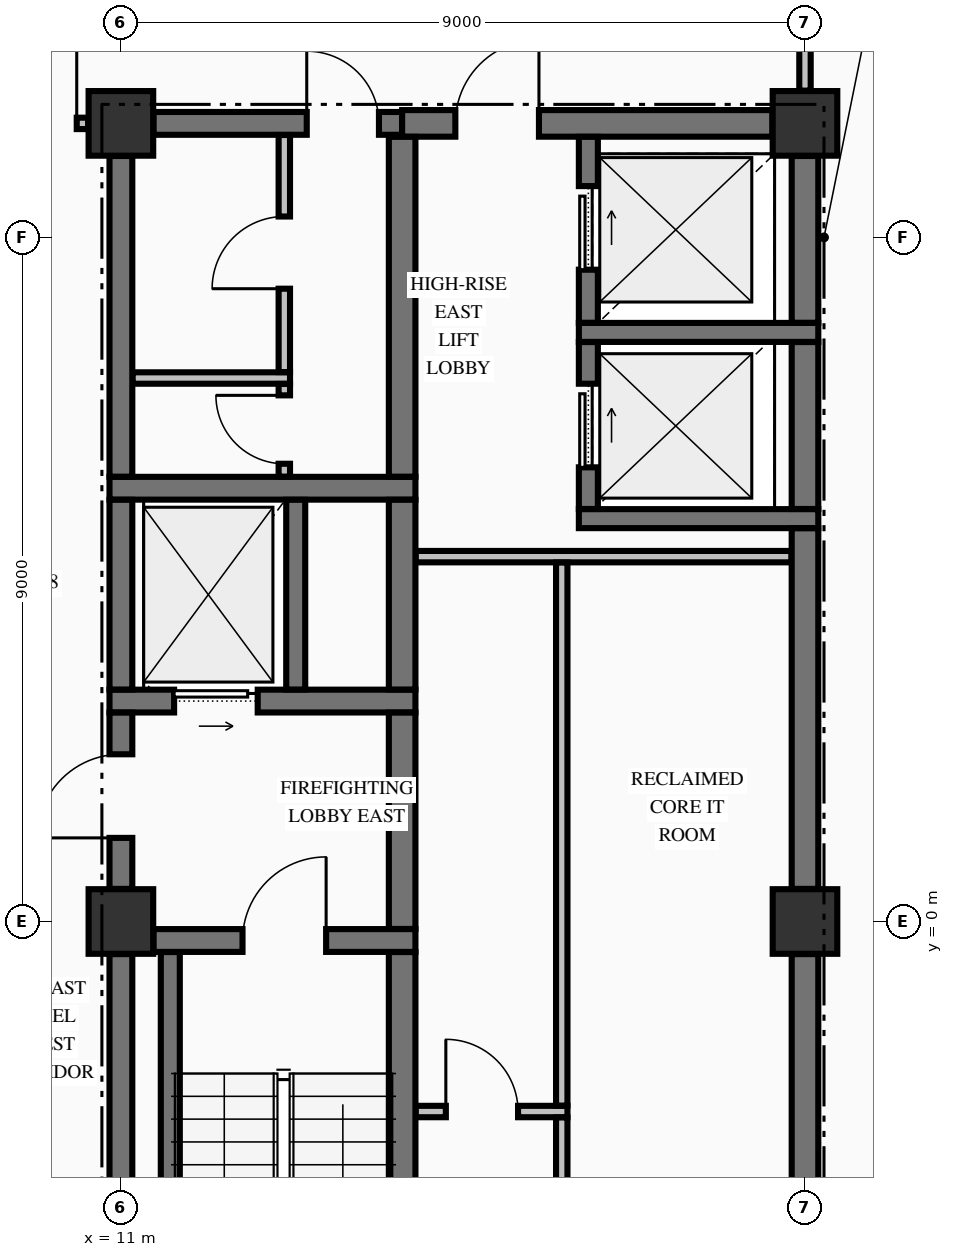
"""IFC4 building model, lengths in metres.
Left out: names, types, materials, properties, quantities, classifications, styles, units other than length and angle.
Written with IfcOpenShell. Run it as: python <this file> out.ifc"""

import sys

from ifc_helpers import new_model, si_unit, direction, frame, frame_2d, origin, origin_2d, place, context, subcontext, project, spatial, rectangle, extrude, element, fill, save


model = new_model("IFC4")
c1 = context("Model", 3, precision=1e-05, world=origin(), true_north=direction((0.0, 1.0)))
c2 = subcontext(c1, "Body", "Model", "MODEL_VIEW")
j1 = project(units=[si_unit("LENGTHUNIT", "METRE"), si_unit("PLANEANGLEUNIT", "RADIAN")], contexts=[c1])
p1 = place(None, origin())
s1 = spatial("IfcSite", under=j1, at=p1, CompositionType="ELEMENT")
p2 = place(p1, origin())
s2 = spatial("IfcBuilding", under=s1, at=p2, CompositionType="ELEMENT")
p3 = place(p2, frame((0.0, 0.0, 205.06)))
s3 = spatial("IfcBuildingStorey", under=s2, at=p3, CompositionType="ELEMENT", Elevation=205.06)
for number, where, z_axis, x_axis in (
    (1, (11.0, 0.0, -0.25), (0.0, 0.0, 1.0), (1.0, 0.0, 0.0)),
    (2, (11.0, 10.5, -0.25), (0.0, 0.0, 1.0), (1.0, 0.0, 0.0)),
    (3, (20.0, 10.5, -0.25), (0.0, 0.0, 1.0), (1.0, 0.0, 0.0)),
    (4, (20.0, 0.0, -0.25), (0.0, 0.0, 1.0), (1.0, 0.0, 0.0)),
):
    element("IfcColumn", number, at=place(p3, frame(where, z_axis=z_axis, x_axis=x_axis)), inside=s3, PredefinedType="COLUMN", context=c2, shape_type="SweptSolid", body=[
        extrude(rectangle(XDim=0.85, YDim=0.85, at=origin_2d()), origin(), (0.0, 0.0, 1.0), 3.4),
    ])
p4 = place(p3, frame((11.429, -0.25, 0.0), z_axis=(0.0, 0.0, 1.0), x_axis=(1.0, 0.0, 0.0)))
e5 = element("IfcWall", 5, at=p4, inside=s3, PredefinedType="SHEAR", context=c2, shape_type="SweptSolid", body=[
    extrude(rectangle(XDim=3.446, YDim=0.3, at=frame_2d((1.723, 0.0))), origin(), (0.0, 0.0, 1.0), 3.15),
])
p5 = place(p4, frame((1.171, 0.0, 0.0)))
e6 = element("IfcOpeningElement", 6, at=p5, cuts=e5, PredefinedType="OPENING", context=c2, shape_type="SweptSolid", body=[
    extrude(rectangle(XDim=1.1, YDim=2.15, at=frame_2d((0.55, 1.075))), frame((0.0, 0.16, 0.0), z_axis=(0.0, -1.0, 0.0), x_axis=(1.0, 0.0, 0.0)), (0.0, 0.0, 1.0), 0.32),
])
p6 = place(p3, frame((10.85, 2.9, 0.0), z_axis=(0.0, 0.0, 1.0), x_axis=(1.0, 0.0, 0.0)))
e7 = element("IfcWall", 7, at=p6, inside=s3, PredefinedType="SHEAR", context=c2, shape_type="SweptSolid", body=[
    extrude(rectangle(XDim=4.025, YDim=0.3, at=frame_2d((2.012, 0.0))), origin(), (0.0, 0.0, 1.0), 3.15),
])
p7 = place(p6, frame((0.85, 0.0, 0.0)))
e8 = element("IfcOpeningElement", 8, at=p7, cuts=e7, PredefinedType="OPENING", context=c2, shape_type="SweptSolid", body=[
    extrude(rectangle(XDim=1.1, YDim=2.2, at=frame_2d((0.55, 1.1))), frame((0.0, 0.16, 0.0), z_axis=(0.0, -1.0, 0.0), x_axis=(1.0, 0.0, 0.0)), (0.0, 0.0, 1.0), 0.32),
])
p8 = place(p3, frame((17.025, 5.3, 0.0), z_axis=(0.0, 0.0, 1.0), x_axis=(1.0, 0.0, 0.0)))
e9 = element("IfcWall", 9, at=p8, inside=s3, PredefinedType="SOLIDWALL", context=c2, shape_type="SweptSolid", body=[
    extrude(rectangle(XDim=3.15, YDim=0.25, at=frame_2d((1.575, 0.0))), origin(), (0.0, 0.0, 1.0), 3.15),
])
p9 = place(p3, frame((10.85, 5.7, 0.0), z_axis=(0.0, 0.0, 1.0), x_axis=(1.0, 0.0, 0.0)))
e10 = element("IfcWall", 10, at=p9, inside=s3, PredefinedType="SHEAR", context=c2, shape_type="SweptSolid", body=[
    extrude(rectangle(XDim=4.025, YDim=0.3, at=frame_2d((2.012, 0.0))), origin(), (0.0, 0.0, 1.0), 3.15),
])
p10 = place(p3, frame((17.025, 7.75, 0.0), z_axis=(0.0, 0.0, 1.0), x_axis=(1.0, 0.0, 0.0)))
e11 = element("IfcWall", 11, at=p10, inside=s3, PredefinedType="SOLIDWALL", context=c2, shape_type="SweptSolid", body=[
    extrude(rectangle(XDim=3.15, YDim=0.25, at=frame_2d((1.575, 0.0))), origin(), (0.0, 0.0, 1.0), 3.15),
])
p11 = place(p3, frame((11.429, 10.5, 0.0), z_axis=(0.0, 0.0, 1.0), x_axis=(1.0, 0.0, 0.0)))
e12 = element("IfcWall", 12, at=p11, inside=s3, PredefinedType="SHEAR", context=c2, shape_type="SweptSolid", body=[
    extrude(rectangle(XDim=3.271, YDim=0.3, at=frame_2d((1.635, 0.0))), origin(), (0.0, 0.0, 1.0), 3.15),
])
p12 = place(p11, frame((2.016, 0.0, 0.0)))
e13 = element("IfcOpeningElement", 13, at=p12, cuts=e12, PredefinedType="OPENING", context=c2, shape_type="SweptSolid", body=[
    extrude(rectangle(XDim=0.95, YDim=2.15, at=frame_2d((0.475, 1.075))), frame((0.0, 0.16, 0.0), z_axis=(0.0, -1.0, 0.0), x_axis=(1.0, 0.0, 0.0)), (0.0, 0.0, 1.0), 0.32),
])
p13 = place(p3, frame((14.7, 10.5, 0.0), z_axis=(0.0, 0.0, 1.0), x_axis=(1.0, 0.0, 0.0)))
e14 = element("IfcWall", 14, at=p13, inside=s3, PredefinedType="SHEAR", context=c2, shape_type="SweptSolid", body=[
    extrude(rectangle(XDim=4.871, YDim=0.35, at=frame_2d((2.436, 0.0))), origin(), (0.0, 0.0, 1.0), 3.15),
])
p14 = place(p13, frame((0.7, 0.0, 0.0)))
e15 = element("IfcOpeningElement", 15, at=p14, cuts=e14, PredefinedType="OPENING", context=c2, shape_type="SweptSolid", body=[
    extrude(rectangle(XDim=1.1, YDim=2.15, at=frame_2d((0.55, 1.075))), frame((0.0, 0.185, 0.0), z_axis=(0.0, -1.0, 0.0), x_axis=(1.0, 0.0, 0.0)), (0.0, 0.0, 1.0), 0.37),
])
p15 = place(p3, frame((14.878, -2.5, 0.0), z_axis=(0.0, 0.0, 1.0), x_axis=(1.0, 0.0, 0.0)))
e16 = element("IfcWall", 16, at=p15, inside=s3, PredefinedType="PARTITIONING", context=c2, shape_type="SweptSolid", body=[
    extrude(rectangle(XDim=1.997, YDim=0.15, at=frame_2d((0.999, 0.0))), origin(), (0.0, 0.0, 1.0), 3.15),
])
p16 = place(p15, frame((0.397, 0.0, 0.0)))
e17 = element("IfcOpeningElement", 17, at=p16, cuts=e16, PredefinedType="OPENING", context=c2, shape_type="SweptSolid", body=[
    extrude(rectangle(XDim=0.95, YDim=2.15, at=frame_2d((0.475, 1.075))), frame((0.0, 0.085, 0.0), z_axis=(0.0, -1.0, 0.0), x_axis=(1.0, 0.0, 0.0)), (0.0, 0.0, 1.0), 0.17),
])
p17 = place(p3, frame((14.878, 4.8, 0.0), z_axis=(0.0, 0.0, 1.0), x_axis=(1.0, 0.0, 0.0)))
e18 = element("IfcWall", 18, at=p17, inside=s3, PredefinedType="PARTITIONING", context=c2, shape_type="SweptSolid", body=[
    extrude(rectangle(XDim=4.944, YDim=0.15, at=frame_2d((2.472, 0.0))), origin(), (0.0, 0.0, 1.0), 3.15),
])
p18 = place(p3, frame((11.153, 7.15, 0.0), z_axis=(0.0, 0.0, 1.0), x_axis=(1.0, 0.0, 0.0)))
e19 = element("IfcWall", 19, at=p18, inside=s3, PredefinedType="PARTITIONING", context=c2, shape_type="SweptSolid", body=[
    extrude(rectangle(XDim=2.072, YDim=0.15, at=frame_2d((1.036, 0.0))), origin(), (0.0, 0.0, 1.0), 3.15),
])
p19 = place(p3, frame((-10.569, 10.5, 0.0), z_axis=(0.0, 0.0, 1.0), x_axis=(1.0, 0.0, 0.0)))
e20 = element("IfcWall", 20, at=p19, inside=s3, PredefinedType="PARTITIONING", context=c2, shape_type="SweptSolid", body=[
    extrude(rectangle(XDim=21.138, YDim=0.15, at=frame_2d((10.569, 0.0))), origin(), (0.0, 0.0, 1.0), 3.15),
])
p20 = place(p19, frame((0.15, 0.0, 0.0)))
e21 = element("IfcOpeningElement", 21, at=p20, cuts=e20, PredefinedType="OPENING", context=c2, shape_type="SweptSolid", body=[
    extrude(rectangle(XDim=1.05, YDim=2.15, at=frame_2d((0.525, 1.075))), frame((0.0, 0.085, 0.0), z_axis=(0.0, -1.0, 0.0), x_axis=(1.0, 0.0, 0.0)), (0.0, 0.0, 1.0), 0.17),
])
p21 = place(p19, frame((19.938, 0.0, 0.0)))
e22 = element("IfcOpeningElement", 22, at=p21, cuts=e20, PredefinedType="OPENING", context=c2, shape_type="SweptSolid", body=[
    extrude(rectangle(XDim=1.05, YDim=2.15, at=frame_2d((0.525, 1.075))), frame((0.0, 0.085, 0.0), z_axis=(0.0, -1.0, 0.0), x_axis=(1.0, 0.0, 0.0)), (0.0, 0.0, 1.0), 0.17),
])
p22 = place(p3, frame((11.0, -9.521, 0.0), z_axis=(0.0, 0.0, 1.0), x_axis=(0.0, 1.0, 0.0)))
e23 = element("IfcWall", 23, at=p22, inside=s3, PredefinedType="SHEAR", context=c2, shape_type="SweptSolid", body=[
    extrude(rectangle(XDim=9.092, YDim=0.3, at=frame_2d((4.546, 0.0))), origin(), (0.0, 0.0, 1.0), 3.15),
])
p23 = place(p3, frame((11.0, 0.429, 0.0), z_axis=(0.0, 0.0, 1.0), x_axis=(0.0, 1.0, 0.0)))
e24 = element("IfcWall", 24, at=p23, inside=s3, PredefinedType="SHEAR", context=c2, shape_type="SweptSolid", body=[
    extrude(rectangle(XDim=2.319, YDim=0.3, at=frame_2d((1.16, 0.0))), origin(), (0.0, 0.0, 1.0), 3.15),
])
p24 = place(p23, frame((0.671, 0.0, 0.0)))
e25 = element("IfcOpeningElement", 25, at=p24, cuts=e24, PredefinedType="OPENING", context=c2, shape_type="SweptSolid", body=[
    extrude(rectangle(XDim=1.1, YDim=2.15, at=frame_2d((0.55, 1.075))), frame((0.0, 0.16, 0.0), z_axis=(0.0, -1.0, 0.0), x_axis=(1.0, 0.0, 0.0)), (0.0, 0.0, 1.0), 0.32),
])
p25 = place(p3, frame((11.0, 3.052, 0.0), z_axis=(0.0, 0.0, 1.0), x_axis=(0.0, 1.0, 0.0)))
e26 = element("IfcWall", 26, at=p25, inside=s3, PredefinedType="SHEAR", context=c2, shape_type="SweptSolid", body=[
    extrude(rectangle(XDim=2.496, YDim=0.3, at=frame_2d((1.248, 0.0))), origin(), (0.0, 0.0, 1.0), 3.15),
])
p26 = place(p3, frame((11.0, 5.852, 0.0), z_axis=(0.0, 0.0, 1.0), x_axis=(0.0, 1.0, 0.0)))
e27 = element("IfcWall", 27, at=p26, inside=s3, PredefinedType="SHEAR", context=c2, shape_type="SweptSolid", body=[
    extrude(rectangle(XDim=4.219, YDim=0.3, at=frame_2d((2.109, 0.0))), origin(), (0.0, 0.0, 1.0), 3.15),
])
p27 = place(p3, frame((11.65, -9.798, 0.0), z_axis=(0.0, 0.0, 1.0), x_axis=(0.0, 1.0, 0.0)))
e28 = element("IfcWall", 28, at=p27, inside=s3, PredefinedType="SOLIDWALL", context=c2, shape_type="SweptSolid", body=[
    extrude(rectangle(XDim=9.396, YDim=0.25, at=frame_2d((4.698, 0.0))), origin(), (0.0, 0.0, 1.0), 3.15),
])
p28 = place(p3, frame((13.3, 3.052, 0.0), z_axis=(0.0, 0.0, 1.0), x_axis=(0.0, 1.0, 0.0)))
e29 = element("IfcWall", 29, at=p28, inside=s3, PredefinedType="SOLIDWALL", context=c2, shape_type="SweptSolid", body=[
    extrude(rectangle(XDim=2.496, YDim=0.25, at=frame_2d((1.248, 0.0))), origin(), (0.0, 0.0, 1.0), 3.15),
])
p29 = place(p3, frame((14.7, -9.773, 0.0), z_axis=(0.0, 0.0, 1.0), x_axis=(0.0, 1.0, 0.0)))
e30 = element("IfcWall", 30, at=p29, inside=s3, PredefinedType="SHEAR", context=c2, shape_type="SweptSolid", body=[
    extrude(rectangle(XDim=9.371, YDim=0.35, at=frame_2d((4.686, 0.0))), origin(), (0.0, 0.0, 1.0), 3.15),
])
p30 = place(p3, frame((14.7, -0.098, 0.0), z_axis=(0.0, 0.0, 1.0), x_axis=(0.0, 1.0, 0.0)))
e31 = element("IfcWall", 31, at=p30, inside=s3, PredefinedType="SHEAR", context=c2, shape_type="SweptSolid", body=[
    extrude(rectangle(XDim=2.846, YDim=0.35, at=frame_2d((1.423, 0.0))), origin(), (0.0, 0.0, 1.0), 3.15),
])
p31 = place(p3, frame((14.7, 3.052, 0.0), z_axis=(0.0, 0.0, 1.0), x_axis=(0.0, 1.0, 0.0)))
e32 = element("IfcWall", 32, at=p31, inside=s3, PredefinedType="SHEAR", context=c2, shape_type="SweptSolid", body=[
    extrude(rectangle(XDim=2.496, YDim=0.35, at=frame_2d((1.248, 0.0))), origin(), (0.0, 0.0, 1.0), 3.15),
])
p32 = place(p3, frame((14.7, 5.852, 0.0), z_axis=(0.0, 0.0, 1.0), x_axis=(0.0, 1.0, 0.0)))
e33 = element("IfcWall", 33, at=p32, inside=s3, PredefinedType="SHEAR", context=c2, shape_type="SweptSolid", body=[
    extrude(rectangle(XDim=4.471, YDim=0.35, at=frame_2d((2.235, 0.0))), origin(), (0.0, 0.0, 1.0), 3.15),
])
p33 = place(p3, frame((17.15, 5.427, 0.0), z_axis=(0.0, 0.0, 1.0), x_axis=(0.0, 1.0, 0.0)))
e34 = element("IfcWall", 34, at=p33, inside=s3, PredefinedType="SOLIDWALL", context=c2, shape_type="SweptSolid", body=[
    extrude(rectangle(XDim=2.196, YDim=0.25, at=frame_2d((1.098, 0.0))), origin(), (0.0, 0.0, 1.0), 3.15),
])
p34 = place(p33, frame((0.548, 0.0, 0.0)))
e35 = element("IfcOpeningElement", 35, at=p34, cuts=e34, PredefinedType="OPENING", context=c2, shape_type="SweptSolid", body=[
    extrude(rectangle(XDim=1.1, YDim=2.2, at=frame_2d((0.55, 1.1))), frame((0.0, 0.135, 0.0), z_axis=(0.0, -1.0, 0.0), x_axis=(1.0, 0.0, 0.0)), (0.0, 0.0, 1.0), 0.27),
])
p35 = place(p3, frame((17.15, 7.877, 0.0), z_axis=(0.0, 0.0, 1.0), x_axis=(0.0, 1.0, 0.0)))
e36 = element("IfcWall", 36, at=p35, inside=s3, PredefinedType="SOLIDWALL", context=c2, shape_type="SweptSolid", body=[
    extrude(rectangle(XDim=2.446, YDim=0.25, at=frame_2d((1.223, 0.0))), origin(), (0.0, 0.0, 1.0), 3.15),
])
p36 = place(p35, frame((0.698, 0.0, 0.0)))
e37 = element("IfcOpeningElement", 37, at=p36, cuts=e36, PredefinedType="OPENING", context=c2, shape_type="SweptSolid", body=[
    extrude(rectangle(XDim=1.1, YDim=2.2, at=frame_2d((0.55, 1.1))), frame((0.0, 0.135, 0.0), z_axis=(0.0, -1.0, 0.0), x_axis=(1.0, 0.0, 0.0)), (0.0, 0.0, 1.0), 0.27),
])
p37 = place(p3, frame((20.0, -9.521, 0.0), z_axis=(0.0, 0.0, 1.0), x_axis=(0.0, 1.0, 0.0)))
e38 = element("IfcWall", 38, at=p37, inside=s3, PredefinedType="SHEAR", context=c2, shape_type="SweptSolid", body=[
    extrude(rectangle(XDim=9.092, YDim=0.35, at=frame_2d((4.546, 0.0))), origin(), (0.0, 0.0, 1.0), 3.15),
])
p38 = place(p3, frame((20.0, 0.429, 0.0), z_axis=(0.0, 0.0, 1.0), x_axis=(0.0, 1.0, 0.0)))
e39 = element("IfcWall", 39, at=p38, inside=s3, PredefinedType="SHEAR", context=c2, shape_type="SweptSolid", body=[
    extrude(rectangle(XDim=4.744, YDim=0.35, at=frame_2d((2.372, 0.0))), origin(), (0.0, 0.0, 1.0), 3.15),
])
p39 = place(p3, frame((20.0, 5.427, 0.0), z_axis=(0.0, 0.0, 1.0), x_axis=(0.0, 1.0, 0.0)))
e40 = element("IfcWall", 40, at=p39, inside=s3, PredefinedType="SHEAR", context=c2, shape_type="SweptSolid", body=[
    extrude(rectangle(XDim=2.196, YDim=0.35, at=frame_2d((1.098, 0.0))), origin(), (0.0, 0.0, 1.0), 3.15),
])
p40 = place(p3, frame((20.0, 7.877, 0.0), z_axis=(0.0, 0.0, 1.0), x_axis=(0.0, 1.0, 0.0)))
e41 = element("IfcWall", 41, at=p40, inside=s3, PredefinedType="SHEAR", context=c2, shape_type="SweptSolid", body=[
    extrude(rectangle(XDim=2.194, YDim=0.35, at=frame_2d((1.097, 0.0))), origin(), (0.0, 0.0, 1.0), 3.15),
])
p41 = place(p3, frame((13.15, 5.853, 0.0), z_axis=(0.0, 0.0, 1.0), x_axis=(0.0, 1.0, 0.0)))
e42 = element("IfcWall", 42, at=p41, inside=s3, PredefinedType="PARTITIONING", context=c2, shape_type="SweptSolid", body=[
    extrude(rectangle(XDim=1.219, YDim=0.15, at=frame_2d((0.609, 0.0))), origin(), (0.0, 0.0, 1.0), 3.15),
])
p42 = place(p41, frame((0.169, 0.0, 0.0)))
e43 = element("IfcOpeningElement", 43, at=p42, cuts=e42, PredefinedType="OPENING", context=c2, shape_type="SweptSolid", body=[
    extrude(rectangle(XDim=0.9, YDim=2.15, at=frame_2d((0.45, 1.075))), frame((0.0, 0.085, 0.0), z_axis=(0.0, -1.0, 0.0), x_axis=(1.0, 0.0, 0.0)), (0.0, 0.0, 1.0), 0.17),
])
p43 = place(p3, frame((13.15, 7.228, 0.0), z_axis=(0.0, 0.0, 1.0), x_axis=(0.0, 1.0, 0.0)))
e44 = element("IfcWall", 44, at=p43, inside=s3, PredefinedType="PARTITIONING", context=c2, shape_type="SweptSolid", body=[
    extrude(rectangle(XDim=3.119, YDim=0.15, at=frame_2d((1.56, 0.0))), origin(), (0.0, 0.0, 1.0), 3.15),
])
p44 = place(p43, frame((1.097, 0.0, 0.0)))
e45 = element("IfcOpeningElement", 45, at=p44, cuts=e44, PredefinedType="OPENING", context=c2, shape_type="SweptSolid", body=[
    extrude(rectangle(XDim=0.95, YDim=2.15, at=frame_2d((0.475, 1.075))), frame((0.0, 0.085, 0.0), z_axis=(0.0, -1.0, 0.0), x_axis=(1.0, 0.0, 0.0)), (0.0, 0.0, 1.0), 0.17),
])
p45 = place(p3, frame((16.8, -9.772, 0.0), z_axis=(0.0, 0.0, 1.0), x_axis=(0.0, 1.0, 0.0)))
e46 = element("IfcWall", 46, at=p45, inside=s3, PredefinedType="PARTITIONING", context=c2, shape_type="SweptSolid", body=[
    extrude(rectangle(XDim=7.194, YDim=0.15, at=frame_2d((3.597, 0.0))), origin(), (0.0, 0.0, 1.0), 3.15),
])
p46 = place(p3, frame((16.8, -2.422, 0.0), z_axis=(0.0, 0.0, 1.0), x_axis=(0.0, 1.0, 0.0)))
e47 = element("IfcWall", 47, at=p46, inside=s3, PredefinedType="PARTITIONING", context=c2, shape_type="SweptSolid", body=[
    extrude(rectangle(XDim=7.144, YDim=0.15, at=frame_2d((3.572, 0.0))), origin(), (0.0, 0.0, 1.0), 3.15),
])
p47 = place(p3, frame((20.0, 10.931, 0.0), z_axis=(0.0, 0.0, 1.0), x_axis=(0.0, 1.0, 0.0)))
e48 = element("IfcWall", 48, at=p47, inside=s3, PredefinedType="PARTITIONING", context=c2, shape_type="SweptSolid", body=[
    extrude(rectangle(XDim=1.741, YDim=0.15, at=frame_2d((0.871, 0.0))), origin(), (0.0, 0.0, 1.0), 2.342),
])
p48 = place(p5, origin())
e49 = element("IfcDoor", 49, at=p48, inside=s3, OperationType="SINGLE_SWING_RIGHT", PredefinedType="DOOR", context=c2, shape_type="SweptSolid", body=[
    extrude(rectangle(XDim=1.1, YDim=2.15, at=frame_2d((0.55, 1.075))), frame((0.0, 0.025, 0.0), z_axis=(0.0, -1.0, 0.0), x_axis=(1.0, 0.0, 0.0)), (0.0, 0.0, 1.0), 0.05),
])
fill(e6, e49)
p49 = place(p24, origin())
e50 = element("IfcDoor", 50, at=p49, inside=s3, OperationType="SINGLE_SWING_LEFT", PredefinedType="DOOR", context=c2, shape_type="SweptSolid", body=[
    extrude(rectangle(XDim=1.1, YDim=2.15, at=frame_2d((0.55, 1.075))), frame((0.0, 0.025, 0.0), z_axis=(0.0, -1.0, 0.0), x_axis=(1.0, 0.0, 0.0)), (0.0, 0.0, 1.0), 0.05),
])
fill(e25, e50)
p50 = place(p7, origin())
e51 = element("IfcDoor", 51, at=p50, inside=s3, OperationType="SLIDING_TO_RIGHT", PredefinedType="DOOR", context=c2, shape_type="SweptSolid", body=[
    extrude(rectangle(XDim=1.1, YDim=2.2, at=frame_2d((0.55, 1.1))), frame((0.0, 0.025, 0.0), z_axis=(0.0, -1.0, 0.0), x_axis=(1.0, 0.0, 0.0)), (0.0, 0.0, 1.0), 0.05),
])
fill(e8, e51)
p51 = place(p12, origin())
e52 = element("IfcDoor", 52, at=p51, inside=s3, OperationType="SINGLE_SWING_LEFT", PredefinedType="DOOR", context=c2, shape_type="SweptSolid", body=[
    extrude(rectangle(XDim=0.95, YDim=2.15, at=frame_2d((0.475, 1.075))), frame((0.0, 0.025, 0.0), z_axis=(0.0, -1.0, 0.0), x_axis=(1.0, 0.0, 0.0)), (0.0, 0.0, 1.0), 0.05),
])
fill(e13, e52)
p52 = place(p42, origin())
e53 = element("IfcDoor", 53, at=p52, inside=s3, OperationType="SINGLE_SWING_RIGHT", PredefinedType="DOOR", context=c2, shape_type="SweptSolid", body=[
    extrude(rectangle(XDim=0.9, YDim=2.15, at=frame_2d((0.45, 1.075))), frame((0.0, 0.025, 0.0), z_axis=(0.0, -1.0, 0.0), x_axis=(1.0, 0.0, 0.0)), (0.0, 0.0, 1.0), 0.05),
])
fill(e43, e53)
p53 = place(p44, origin())
e54 = element("IfcDoor", 54, at=p53, inside=s3, OperationType="SINGLE_SWING_LEFT", PredefinedType="DOOR", context=c2, shape_type="SweptSolid", body=[
    extrude(rectangle(XDim=0.95, YDim=2.15, at=frame_2d((0.475, 1.075))), frame((0.0, 0.025, 0.0), z_axis=(0.0, -1.0, 0.0), x_axis=(1.0, 0.0, 0.0)), (0.0, 0.0, 1.0), 0.05),
])
fill(e45, e54)
p54 = place(p34, origin())
e55 = element("IfcDoor", 55, at=p54, inside=s3, OperationType="SLIDING_TO_RIGHT", PredefinedType="DOOR", context=c2, shape_type="SweptSolid", body=[
    extrude(rectangle(XDim=1.1, YDim=2.2, at=frame_2d((0.55, 1.1))), frame((0.0, 0.025, 0.0), z_axis=(0.0, -1.0, 0.0), x_axis=(1.0, 0.0, 0.0)), (0.0, 0.0, 1.0), 0.05),
])
fill(e35, e55)
p55 = place(p36, origin())
e56 = element("IfcDoor", 56, at=p55, inside=s3, OperationType="SLIDING_TO_RIGHT", PredefinedType="DOOR", context=c2, shape_type="SweptSolid", body=[
    extrude(rectangle(XDim=1.1, YDim=2.2, at=frame_2d((0.55, 1.1))), frame((0.0, 0.025, 0.0), z_axis=(0.0, -1.0, 0.0), x_axis=(1.0, 0.0, 0.0)), (0.0, 0.0, 1.0), 0.05),
])
fill(e37, e56)
p56 = place(p14, origin())
e57 = element("IfcDoor", 57, at=p56, inside=s3, OperationType="SINGLE_SWING_RIGHT", PredefinedType="DOOR", context=c2, shape_type="SweptSolid", body=[
    extrude(rectangle(XDim=1.1, YDim=2.15, at=frame_2d((0.55, 1.075))), frame((0.0, 0.025, 0.0), z_axis=(0.0, -1.0, 0.0), x_axis=(1.0, 0.0, 0.0)), (0.0, 0.0, 1.0), 0.05),
])
fill(e15, e57)
p57 = place(p16, origin())
e58 = element("IfcDoor", 58, at=p57, inside=s3, OperationType="SINGLE_SWING_LEFT", PredefinedType="DOOR", context=c2, shape_type="SweptSolid", body=[
    extrude(rectangle(XDim=0.95, YDim=2.15, at=frame_2d((0.475, 1.075))), frame((0.0, 0.025, 0.0), z_axis=(0.0, -1.0, 0.0), x_axis=(1.0, 0.0, 0.0)), (0.0, 0.0, 1.0), 0.05),
])
fill(e17, e58)
p58 = place(p21, origin())
e59 = element("IfcDoor", 59, at=p58, inside=s3, OperationType="SINGLE_SWING_RIGHT", PredefinedType="DOOR", context=c2, shape_type="SweptSolid", body=[
    extrude(rectangle(XDim=1.05, YDim=2.15, at=frame_2d((0.525, 1.075))), frame((0.0, 0.025, 0.0), z_axis=(0.0, -1.0, 0.0), x_axis=(1.0, 0.0, 0.0)), (0.0, 0.0, 1.0), 0.05),
])
fill(e22, e59)
save(model, sys.argv[1])
